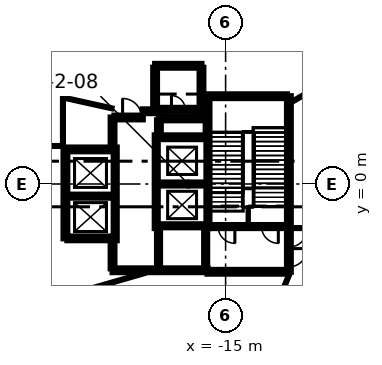
"""IFC4 building model, lengths in metres.
Left out: names, types, materials, properties, quantities, classifications, styles, units other than length and angle.
Written with IfcOpenShell. Run it as: python <this file> out.ifc"""

import sys

from ifc_helpers import new_model, si_unit, direction, frame, frame_2d, origin, place, context, subcontext, project, spatial, rectangle, extrude, element, fill, save


model = new_model("IFC4")
c1 = context("Model", 3, precision=1e-05, world=origin(), true_north=direction((0.0, 1.0)))
c2 = subcontext(c1, "Body", "Model", "MODEL_VIEW")
j1 = project(units=[si_unit("LENGTHUNIT", "METRE"), si_unit("PLANEANGLEUNIT", "RADIAN")], contexts=[c1])
p1 = place(None, origin())
s1 = spatial("IfcSite", under=j1, at=p1, CompositionType="ELEMENT")
p2 = place(p1, origin())
s2 = spatial("IfcBuilding", under=s1, at=p2, CompositionType="ELEMENT")
p3 = place(p2, origin())
s3 = spatial("IfcBuildingStorey", under=s2, at=p3, CompositionType="ELEMENT", Elevation=0.0)
p4 = place(p3, frame((-10.837, 5.775, 0.0), z_axis=(0.0, 0.0, 1.0), x_axis=(0.0, -1.0, 0.0)))
e1 = element("IfcWall", 1, at=p4, inside=s3, PredefinedType="SHEAR", context=c2, shape_type="SweptSolid", body=[
    extrude(rectangle(XDim=11.55, YDim=0.25, at=frame_2d((5.775, 0.0))), origin(), (0.0, 0.0, 1.0), 7.1),
])
p5 = place(p4, frame((10.025, 0.0, 0.0)))
e2 = element("IfcOpeningElement", 2, at=p5, cuts=e1, PredefinedType="OPENING", context=c2, shape_type="SweptSolid", body=[
    extrude(rectangle(XDim=1.2, YDim=2.1, at=frame_2d((0.6, 1.05))), frame((0.0, 0.135, 0.0), z_axis=(0.0, -1.0, 0.0), x_axis=(1.0, 0.0, 0.0)), (0.0, 0.0, 1.0), 0.27),
])
p6 = place(p4, frame((8.725, 0.0, 0.0)))
e3 = element("IfcOpeningElement", 3, at=p6, cuts=e1, PredefinedType="OPENING", context=c2, shape_type="SweptSolid", body=[
    extrude(rectangle(XDim=1.2, YDim=2.1, at=frame_2d((0.6, 1.05))), frame((0.0, 0.135, 0.0), z_axis=(0.0, -1.0, 0.0), x_axis=(1.0, 0.0, 0.0)), (0.0, 0.0, 1.0), 0.27),
])
p7 = place(p3, frame((-16.187, -5.675, 0.0), z_axis=(0.0, 0.0, 1.0), x_axis=(-1.0, 0.0, 0.0)))
e4 = element("IfcWall", 4, at=p7, inside=s3, PredefinedType="SHEAR", context=c2, shape_type="SweptSolid", body=[
    extrude(rectangle(XDim=6.25, YDim=0.25, at=frame_2d((3.125, 0.0))), origin(), (0.0, 0.0, 1.0), 7.1),
])
p8 = place(p3, frame((-25.537, -3.575, 0.0), z_axis=(0.0, 0.0, 1.0), x_axis=(0.0, 1.0, 0.0)))
e5 = element("IfcWall", 5, at=p8, inside=s3, PredefinedType="SHEAR", context=c2, shape_type="SweptSolid", body=[
    extrude(rectangle(XDim=5.85, YDim=0.25, at=frame_2d((2.925, 0.0))), origin(), (0.0, 0.0, 1.0), 7.1),
])
p9 = place(p3, frame((-10.963, -5.775, 0.0), z_axis=(0.0, 0.0, 1.0), x_axis=(-1.0, 0.0, 0.0)))
e6 = element("IfcWall", 6, at=p9, inside=s3, PredefinedType="SHEAR", context=c2, shape_type="SweptSolid", body=[
    extrude(rectangle(XDim=5.225, YDim=0.25, at=frame_2d((2.612, 0.0))), origin(), (0.0, 0.0, 1.0), 7.1),
])
p10 = place(p3, frame((-16.472, 5.775, 0.0), z_axis=(0.0, 0.0, 1.0), x_axis=(1.0, 0.0, 0.0)))
e7 = element("IfcWall", 7, at=p10, inside=s3, PredefinedType="SHEAR", context=c2, shape_type="SweptSolid", body=[
    extrude(rectangle(XDim=5.51, YDim=0.25, at=frame_2d((2.755, 0.0))), origin(), (0.0, 0.0, 1.0), 7.1),
])
p11 = place(p3, frame((-19.387, 3.075, 0.0), z_axis=(0.0, 0.0, 1.0), x_axis=(1.0, 0.0, 0.0)))
e8 = element("IfcWall", 8, at=p11, inside=s3, PredefinedType="SHEAR", context=c2, shape_type="SweptSolid", body=[
    extrude(rectangle(XDim=3.2, YDim=0.25, at=frame_2d((1.6, 0.0))), origin(), (0.0, 0.0, 1.0), 7.1),
])
for number, where, z_axis, x_axis in (
    (9, (-22.437, -3.575, 0.0), (0.0, 0.0, 1.0), (-1.0, 0.0, 0.0)),
    (10, (-25.412, 2.275, 0.0), (0.0, 0.0, 1.0), (1.0, 0.0, 0.0)),
):
    element("IfcWall", number, at=place(p3, frame(where, z_axis=z_axis, x_axis=x_axis)), inside=s3, PredefinedType="SHEAR", context=c2, shape_type="SweptSolid", body=[
        extrude(rectangle(XDim=2.975, YDim=0.25, at=frame_2d((1.487, 0.0))), origin(), (0.0, 0.0, 1.0), 7.1),
    ])
p12 = place(p3, frame((-19.637, 7.775, 0.0), z_axis=(0.0, 0.0, 1.0), x_axis=(1.0, 0.0, 0.0)))
e11 = element("IfcWall", 11, at=p12, inside=s3, PredefinedType="SHEAR", context=c2, shape_type="SweptSolid", body=[
    extrude(rectangle(XDim=3.05, YDim=0.25, at=frame_2d((1.525, 0.0))), origin(), (0.0, 0.0, 1.0), 7.1),
])
for number, where, z_axis, x_axis in (
    (12, (-16.587, 7.65, 0.0), (0.0, 0.0, 1.0), (0.0, -1.0, 0.0)),
    (13, (-19.637, 4.785, 0.0), (0.0, 0.0, 1.0), (0.0, 1.0, 0.0)),
):
    element("IfcWall", number, at=place(p3, frame(where, z_axis=z_axis, x_axis=x_axis)), inside=s3, PredefinedType="SHEAR", context=c2, shape_type="SweptSolid", body=[
        extrude(rectangle(XDim=2.865, YDim=0.25, at=frame_2d((1.432, 0.0))), origin(), (0.0, 0.0, 1.0), 7.1),
    ])
p13 = place(p3, frame((-16.302, 4.315, 0.0), z_axis=(0.0, 0.0, 1.0), x_axis=(-1.0, 0.0, 0.0)))
e14 = element("IfcWall", 14, at=p13, inside=s3, PredefinedType="SHEAR", context=c2, shape_type="SweptSolid", body=[
    extrude(rectangle(XDim=3.085, YDim=0.25, at=frame_2d((1.542, 0.0))), origin(), (0.0, 0.0, 1.0), 7.1),
])
p14 = place(p3, frame((-16.187, 3.2, 0.0), z_axis=(0.0, 0.0, 1.0), x_axis=(0.0, 1.0, 0.0)))
e15 = element("IfcWall", 15, at=p14, inside=s3, PredefinedType="SHEAR", context=c2, shape_type="SweptSolid", body=[
    extrude(rectangle(XDim=2.449, YDim=0.25, at=frame_2d((1.225, 0.0))), origin(), (0.0, 0.0, 1.0), 7.1),
])
p15 = place(p3, frame((-22.437, 2.4, 0.0), z_axis=(0.0, 0.0, 1.0), x_axis=(0.0, 1.0, 0.0)))
e16 = element("IfcWall", 16, at=p15, inside=s3, PredefinedType="SHEAR", context=c2, shape_type="SweptSolid", body=[
    extrude(rectangle(XDim=1.975, YDim=0.25, at=frame_2d((0.987, 0.0))), origin(), (0.0, 0.0, 1.0), 7.1),
])
p16 = place(p3, frame((-22.437, -5.55, 0.0), z_axis=(0.0, 0.0, 1.0), x_axis=(0.0, 1.0, 0.0)))
e17 = element("IfcWall", 17, at=p16, inside=s3, PredefinedType="SHEAR", context=c2, shape_type="SweptSolid", body=[
    extrude(rectangle(XDim=1.849, YDim=0.25, at=frame_2d((0.925, 0.0))), origin(), (0.0, 0.0, 1.0), 7.1),
])
p17 = place(p3, frame((-22.312, 4.375, 0.0), z_axis=(0.0, 0.0, 1.0), x_axis=(1.0, 0.0, 0.0)))
e18 = element("IfcWall", 18, at=p17, inside=s3, PredefinedType="SHEAR", context=c2, shape_type="SweptSolid", body=[
    extrude(rectangle(XDim=1.865, YDim=0.25, at=frame_2d((0.932, 0.0))), origin(), (0.0, 0.0, 1.0), 7.1),
])
p18 = place(p17, frame((0.535, 0.0, 0.0)))
e19 = element("IfcOpeningElement", 19, at=p18, cuts=e18, PredefinedType="OPENING", context=c2, shape_type="SweptSolid", body=[
    extrude(rectangle(XDim=1.25, YDim=2.1, at=frame_2d((0.625, 1.05))), frame((0.0, 0.135, 0.0), z_axis=(0.0, -1.0, 0.0), x_axis=(1.0, 0.0, 0.0)), (0.0, 0.0, 1.0), 0.27),
])
p19 = place(p3, frame((-19.387, 4.19, 0.0), z_axis=(0.0, 0.0, 1.0), x_axis=(0.0, -1.0, 0.0)))
e20 = element("IfcWall", 20, at=p19, inside=s3, PredefinedType="SHEAR", context=c2, shape_type="SweptSolid", body=[
    extrude(rectangle(XDim=0.989, YDim=0.25, at=frame_2d((0.495, 0.0))), origin(), (0.0, 0.0, 1.0), 7.1),
])
p20 = place(p3, frame((-20.447, 4.785, 0.0), z_axis=(0.0, 0.0, 1.0), x_axis=(1.0, 0.0, 0.0)))
e21 = element("IfcWall", 21, at=p20, inside=s3, PredefinedType="SHEAR", context=c2, shape_type="SweptSolid", body=[
    extrude(rectangle(XDim=0.685, YDim=0.25, at=frame_2d((0.342, 0.0))), origin(), (0.0, 0.0, 1.0), 7.1),
])
p21 = place(p3, frame((-16.577, 4.785, 0.0), z_axis=(0.0, 0.0, 1.0), x_axis=(0.0, -1.0, 0.0)))
e22 = element("IfcWall", 22, at=p21, inside=s3, PredefinedType="SHEAR", context=c2, shape_type="SweptSolid", body=[
    extrude(rectangle(XDim=0.344, YDim=0.25, at=frame_2d((0.172, 0.0))), origin(), (0.0, 0.0, 1.0), 7.1),
])
p22 = place(p3, frame((-16.162, 2.951, 0.0), z_axis=(0.0, 0.0, 1.0), x_axis=(0.0, -1.0, 0.0)))
e23 = element("IfcWall", 23, at=p22, inside=s3, PredefinedType="SHEAR", context=c2, shape_type="SweptSolid", body=[
    extrude(rectangle(XDim=5.851, YDim=0.2, at=frame_2d((2.925, 0.0))), origin(), (0.0, 0.0, 1.0), 7.1),
])
p23 = place(p3, frame((-19.562, -2.9, 0.0), z_axis=(0.0, 0.0, 1.0), x_axis=(0.0, 1.0, 0.0)))
e24 = element("IfcWall", 24, at=p23, inside=s3, PredefinedType="SHEAR", context=c2, shape_type="SweptSolid", body=[
    extrude(rectangle(XDim=6.1, YDim=0.2, at=frame_2d((3.05, 0.0))), origin(), (0.0, 0.0, 1.0), 7.1),
])
p24 = place(p23, frame((3.95, 0.0, 0.0)))
e25 = element("IfcOpeningElement", 25, at=p24, cuts=e24, PredefinedType="OPENING", context=c2, shape_type="SweptSolid", body=[
    extrude(rectangle(XDim=1.1, YDim=2.1, at=frame_2d((0.55, 1.05))), frame((0.0, 0.11, 0.0), z_axis=(0.0, -1.0, 0.0), x_axis=(1.0, 0.0, 0.0)), (0.0, 0.0, 1.0), 0.22),
])
p25 = place(p23, frame((0.968, 0.0, 0.0)))
e26 = element("IfcOpeningElement", 26, at=p25, cuts=e24, PredefinedType="OPENING", context=c2, shape_type="SweptSolid", body=[
    extrude(rectangle(XDim=1.1, YDim=2.1, at=frame_2d((0.55, 1.05))), frame((0.0, 0.11, 0.0), z_axis=(0.0, -1.0, 0.0), x_axis=(1.0, 0.0, 0.0)), (0.0, 0.0, 1.0), 0.22),
])
p26 = place(p3, frame((-22.262, 2.4, 0.0), z_axis=(0.0, 0.0, 1.0), x_axis=(0.0, -1.0, 0.0)))
e27 = element("IfcWall", 27, at=p26, inside=s3, PredefinedType="SHEAR", context=c2, shape_type="SweptSolid", body=[
    extrude(rectangle(XDim=6.1, YDim=0.2, at=frame_2d((3.05, 0.0))), origin(), (0.0, 0.0, 1.0), 7.1),
])
p27 = place(p26, frame((1.0, 0.0, 0.0)))
e28 = element("IfcOpeningElement", 28, at=p27, cuts=e27, PredefinedType="OPENING", context=c2, shape_type="SweptSolid", body=[
    extrude(rectangle(XDim=1.2, YDim=2.1, at=frame_2d((0.6, 1.05))), frame((0.0, 0.11, 0.0), z_axis=(0.0, -1.0, 0.0), x_axis=(1.0, 0.0, 0.0)), (0.0, 0.0, 1.0), 0.22),
])
p28 = place(p26, frame((4.05, 0.0, 0.0)))
e29 = element("IfcOpeningElement", 29, at=p28, cuts=e27, PredefinedType="OPENING", context=c2, shape_type="SweptSolid", body=[
    extrude(rectangle(XDim=1.2, YDim=2.1, at=frame_2d((0.6, 1.05))), frame((0.0, 0.11, 0.0), z_axis=(0.0, -1.0, 0.0), x_axis=(1.0, 0.0, 0.0)), (0.0, 0.0, 1.0), 0.22),
])
p29 = place(p3, frame((-10.963, -2.8, 0.0), z_axis=(0.0, 0.0, 1.0), x_axis=(-1.0, 0.0, 0.0)))
e30 = element("IfcWall", 30, at=p29, inside=s3, PredefinedType="SHEAR", context=c2, shape_type="SweptSolid", body=[
    extrude(rectangle(XDim=5.098, YDim=0.2, at=frame_2d((2.549, 0.0))), origin(), (0.0, 0.0, 1.0), 7.1),
])
p30 = place(p29, frame((0.569, 0.0, 0.0)))
e31 = element("IfcOpeningElement", 31, at=p30, cuts=e30, PredefinedType="OPENING", context=c2, shape_type="SweptSolid", body=[
    extrude(rectangle(XDim=1.1, YDim=2.1, at=frame_2d((0.55, 1.05))), frame((0.0, 0.11, 0.0), z_axis=(0.0, -1.0, 0.0), x_axis=(1.0, 0.0, 0.0)), (0.0, 0.0, 1.0), 0.22),
])
p31 = place(p29, frame((3.428, 0.0, 0.0)))
e32 = element("IfcOpeningElement", 32, at=p31, cuts=e30, PredefinedType="OPENING", context=c2, shape_type="SweptSolid", body=[
    extrude(rectangle(XDim=1.1, YDim=2.1, at=frame_2d((0.55, 1.05))), frame((0.0, 0.11, 0.0), z_axis=(0.0, -1.0, 0.0), x_axis=(1.0, 0.0, 0.0)), (0.0, 0.0, 1.0), 0.22),
])
p32 = place(p3, frame((-16.263, 0.0, 0.0), z_axis=(0.0, 0.0, 1.0), x_axis=(-1.0, 0.0, 0.0)))
e33 = element("IfcWall", 33, at=p32, inside=s3, PredefinedType="SHEAR", context=c2, shape_type="SweptSolid", body=[
    extrude(rectangle(XDim=3.198, YDim=0.2, at=frame_2d((1.599, 0.0))), origin(), (0.0, 0.0, 1.0), 7.1),
])
p33 = place(p3, frame((-22.363, -0.8, 0.0), z_axis=(0.0, 0.0, 1.0), x_axis=(-1.0, 0.0, 0.0)))
e34 = element("IfcWall", 34, at=p33, inside=s3, PredefinedType="SHEAR", context=c2, shape_type="SweptSolid", body=[
    extrude(rectangle(XDim=3.048, YDim=0.2, at=frame_2d((1.524, 0.0))), origin(), (0.0, 0.0, 1.0), 7.1),
])
p34 = place(p3, frame((-19.511, 4.91, 0.0), z_axis=(0.0, 0.0, 1.0), x_axis=(1.0, 0.0, 0.0)))
e35 = element("IfcWall", 35, at=p34, inside=s3, PredefinedType="SHEAR", context=c2, shape_type="SweptSolid", body=[
    extrude(rectangle(XDim=2.798, YDim=0.2, at=frame_2d((1.399, 0.0))), origin(), (0.0, 0.0, 1.0), 7.1),
])
p35 = place(p34, frame((0.949, 0.0, 0.0)))
e36 = element("IfcOpeningElement", 36, at=p35, cuts=e35, PredefinedType="OPENING", context=c2, shape_type="SweptSolid", body=[
    extrude(rectangle(XDim=0.9, YDim=2.1, at=frame_2d((0.45, 1.05))), frame((0.0, 0.11, 0.0), z_axis=(0.0, -1.0, 0.0), x_axis=(1.0, 0.0, 0.0)), (0.0, 0.0, 1.0), 0.22),
])
p36 = place(p3, frame((-19.412, -2.75, 0.0), z_axis=(0.0, 0.0, 1.0), x_axis=(1.0, 0.0, 0.0)))
e37 = element("IfcWall", 37, at=p36, inside=s3, PredefinedType="SHEAR", context=c2, shape_type="SweptSolid", body=[
    extrude(rectangle(XDim=3.1, YDim=0.2, at=frame_2d((1.55, 0.0))), origin(), (0.0, 0.0, 1.0), 7.1),
])
p37 = place(p3, frame((-16.312, -2.898, 0.0), z_axis=(0.0, 0.0, 1.0), x_axis=(0.0, -1.0, 0.0)))
e38 = element("IfcWall", 38, at=p37, inside=s3, PredefinedType="SHEAR", context=c2, shape_type="SweptSolid", body=[
    extrude(rectangle(XDim=2.651, YDim=0.2, at=frame_2d((1.325, 0.0))), origin(), (0.0, 0.0, 1.0), 7.1),
])
p38 = place(p37, frame((0.652, 0.0, 0.0)))
e39 = element("IfcOpeningElement", 39, at=p38, cuts=e38, PredefinedType="OPENING", context=c2, shape_type="SweptSolid", body=[
    extrude(rectangle(XDim=1.3, YDim=2.1, at=frame_2d((0.65, 1.05))), frame((0.0, 0.11, 0.0), z_axis=(0.0, -1.0, 0.0), x_axis=(1.0, 0.0, 0.0)), (0.0, 0.0, 1.0), 0.22),
])
p39 = place(p3, frame((-19.412, -5.549, 0.0), z_axis=(0.0, 0.0, 1.0), x_axis=(0.0, 1.0, 0.0)))
e40 = element("IfcWall", 40, at=p39, inside=s3, PredefinedType="SHEAR", context=c2, shape_type="SweptSolid", body=[
    extrude(rectangle(XDim=2.651, YDim=0.2, at=frame_2d((1.325, 0.0))), origin(), (0.0, 0.0, 1.0), 7.1),
])
p40 = place(p3, frame((-13.512, -2.695, 0.0), z_axis=(0.0, 0.0, 1.0), x_axis=(0.0, 1.0, 0.0)))
e41 = element("IfcWall", 41, at=p40, inside=s3, PredefinedType="PARTITIONING", context=c2, shape_type="SweptSolid", body=[
    extrude(rectangle(XDim=1.18, YDim=0.15, at=frame_2d((0.59, 0.0))), origin(), (0.0, 0.0, 1.0), 7.1),
])
p41 = place(p3, frame((-16.602, -20.015, 0.0), z_axis=(0.0, 0.0, 1.0), x_axis=(0.380627809016, 0.924728322808, 0.0)))
e42 = element("IfcWall", 42, at=p41, inside=s3, PredefinedType="PARTITIONING", context=c2, shape_type="SweptSolid", body=[
    extrude(rectangle(XDim=15.199, YDim=0.2, at=frame_2d((7.6, 0.0))), origin(), (0.0, 0.0, 1.0), 4.7),
])
p42 = place(p3, frame((-14.266, -21.167, 0.0), z_axis=(0.0, 0.0, 1.0), x_axis=(0.380713644122, 0.924692987526, 0.0)))
e43 = element("IfcWall", 43, at=p42, inside=s3, PredefinedType="PARTITIONING", context=c2, shape_type="SweptSolid", body=[
    extrude(rectangle(XDim=15.96, YDim=0.2, at=frame_2d((7.98, 0.0))), origin(), (0.0, 0.0, 1.0), 4.7),
])
p43 = place(p3, frame((-10.652, -2.9, 0.0), z_axis=(0.0, 0.0, 1.0), x_axis=(1.0, 0.0, 0.0)))
e44 = element("IfcWall", 44, at=p43, inside=s3, PredefinedType="PARTITIONING", context=c2, shape_type="SweptSolid", body=[
    extrude(rectangle(XDim=2.506, YDim=0.2, at=frame_2d((1.253, 0.0))), origin(), (0.0, 0.0, 1.0), 7.1),
])
p44 = place(p3, frame((-44.998, -12.972, 0.0), z_axis=(0.0, 0.0, 1.0), x_axis=(0.960873245647, 0.27698845788, 0.0)))
e45 = element("IfcWall", 45, at=p44, inside=s3, PredefinedType="PARTITIONING", context=c2, shape_type="SweptSolid", body=[
    extrude(rectangle(XDim=25.676, YDim=0.2, at=frame_2d((12.838, 0.0))), origin(), (0.0, 0.0, 1.0), 4.7),
])
p45 = place(p44, frame((11.946, 0.0, 0.0)))
e46 = element("IfcOpeningElement", 46, at=p45, cuts=e45, PredefinedType="OPENING", context=c2, shape_type="SweptSolid", body=[
    extrude(rectangle(XDim=2.0, YDim=2.1, at=frame_2d((1.0, 1.05))), frame((0.0, 0.11, 0.0), z_axis=(0.0, -1.0, 0.0), x_axis=(1.0, 0.0, 0.0)), (0.0, 0.0, 1.0), 0.22),
])
p46 = place(p3, frame((-38.998, 2.5, 0.0), z_axis=(0.0, 0.0, 1.0), x_axis=(1.0, 0.0, 0.0)))
e47 = element("IfcWall", 47, at=p46, inside=s3, PredefinedType="PARTITIONING", context=c2, shape_type="SweptSolid", body=[
    extrude(rectangle(XDim=13.298, YDim=0.2, at=frame_2d((6.649, 0.0))), origin(), (0.0, 0.0, 1.0), 7.1),
])
p47 = place(p46, frame((6.199, 0.0, 0.0)))
e48 = element("IfcOpeningElement", 48, at=p47, cuts=e47, PredefinedType="OPENING", context=c2, shape_type="SweptSolid", body=[
    extrude(rectangle(XDim=0.9, YDim=2.1, at=frame_2d((0.45, 1.05))), frame((0.0, 0.11, 0.0), z_axis=(0.0, -1.0, 0.0), x_axis=(1.0, 0.0, 0.0)), (0.0, 0.0, 1.0), 0.22),
])
p48 = place(p3, frame((-25.7, 2.5, 0.0), z_axis=(0.0, 0.0, 1.0), x_axis=(0.0, 1.0, 0.0)))
e49 = element("IfcWall", 49, at=p48, inside=s3, PredefinedType="PARTITIONING", context=c2, shape_type="SweptSolid", body=[
    extrude(rectangle(XDim=3.187, YDim=0.2, at=frame_2d((1.594, 0.0))), origin(), (0.0, 0.0, 1.0), 7.1),
])
p49 = place(p3, frame((-25.698, 5.689, 0.0), z_axis=(0.0, 0.0, 1.0), x_axis=(0.976357548796, -0.216161830371, 0.0)))
e50 = element("IfcWall", 50, at=p49, inside=s3, PredefinedType="PARTITIONING", context=c2, shape_type="SweptSolid", body=[
    extrude(rectangle(XDim=3.364, YDim=0.2, at=frame_2d((1.682, 0.0))), origin(), (0.0, 0.0, 1.0), 7.1),
])
p50 = place(p3, frame((-10.652, 5.399, 0.0), z_axis=(0.0, 0.0, 1.0), x_axis=(0.866043217385, 0.49996914467, 0.0)))
e51 = element("IfcWall", 51, at=p50, inside=s3, PredefinedType="PARTITIONING", context=c2, shape_type="SweptSolid", body=[
    extrude(rectangle(XDim=10.366, YDim=0.2, at=frame_2d((5.183, 0.0))), origin(), (0.0, 0.0, 1.0), 7.1),
])
p51 = place(p50, frame((3.948, 0.0, 0.0)))
e52 = element("IfcOpeningElement", 52, at=p51, cuts=e51, PredefinedType="OPENING", context=c2, shape_type="SweptSolid", body=[
    extrude(rectangle(XDim=2.4, YDim=2.1, at=frame_2d((1.2, 1.05))), frame((0.0, 0.11, 0.0), z_axis=(0.0, -1.0, 0.0), x_axis=(1.0, 0.0, 0.0)), (0.0, 0.0, 1.0), 0.22),
])
p52 = place(p38, origin())
e53 = element("IfcDoor", 53, at=p52, inside=s3, OperationType="SLIDING_TO_LEFT", PredefinedType="DOOR", context=c2, shape_type="SweptSolid", body=[
    extrude(rectangle(XDim=1.3, YDim=2.1, at=frame_2d((0.65, 1.05))), frame((0.0, 0.025, 0.0), z_axis=(0.0, -1.0, 0.0), x_axis=(1.0, 0.0, 0.0)), (0.0, 0.0, 1.0), 0.05),
])
fill(e39, e53)
p53 = place(p24, origin())
e54 = element("IfcDoor", 54, at=p53, inside=s3, OperationType="DOUBLE_DOOR_SLIDING", PredefinedType="DOOR", context=c2, shape_type="SweptSolid", body=[
    extrude(rectangle(XDim=1.1, YDim=2.1, at=frame_2d((0.55, 1.05))), frame((0.0, 0.025, 0.0), z_axis=(0.0, -1.0, 0.0), x_axis=(1.0, 0.0, 0.0)), (0.0, 0.0, 1.0), 0.05),
])
fill(e25, e54)
p54 = place(p25, origin())
e55 = element("IfcDoor", 55, at=p54, inside=s3, OperationType="DOUBLE_DOOR_SLIDING", PredefinedType="DOOR", context=c2, shape_type="SweptSolid", body=[
    extrude(rectangle(XDim=1.1, YDim=2.1, at=frame_2d((0.55, 1.05))), frame((0.0, 0.025, 0.0), z_axis=(0.0, -1.0, 0.0), x_axis=(1.0, 0.0, 0.0)), (0.0, 0.0, 1.0), 0.05),
])
fill(e26, e55)
p55 = place(p27, origin())
e56 = element("IfcDoor", 56, at=p55, inside=s3, OperationType="DOUBLE_DOOR_SLIDING", PredefinedType="DOOR", context=c2, shape_type="SweptSolid", body=[
    extrude(rectangle(XDim=1.2, YDim=2.1, at=frame_2d((0.6, 1.05))), frame((0.0, 0.025, 0.0), z_axis=(0.0, -1.0, 0.0), x_axis=(1.0, 0.0, 0.0)), (0.0, 0.0, 1.0), 0.05),
])
fill(e28, e56)
p56 = place(p28, origin())
e57 = element("IfcDoor", 57, at=p56, inside=s3, OperationType="DOUBLE_DOOR_SLIDING", PredefinedType="DOOR", context=c2, shape_type="SweptSolid", body=[
    extrude(rectangle(XDim=1.2, YDim=2.1, at=frame_2d((0.6, 1.05))), frame((0.0, 0.025, 0.0), z_axis=(0.0, -1.0, 0.0), x_axis=(1.0, 0.0, 0.0)), (0.0, 0.0, 1.0), 0.05),
])
fill(e29, e57)
p57 = place(p18, origin())
e58 = element("IfcDoor", 58, at=p57, inside=s3, OperationType="SINGLE_SWING_LEFT", PredefinedType="DOOR", context=c2, shape_type="SweptSolid", body=[
    extrude(rectangle(XDim=1.25, YDim=2.1, at=frame_2d((0.625, 1.05))), frame((0.0, 0.025, 0.0), z_axis=(0.0, -1.0, 0.0), x_axis=(1.0, 0.0, 0.0)), (0.0, 0.0, 1.0), 0.05),
])
fill(e19, e58)
p58 = place(p5, origin())
e59 = element("IfcDoor", 59, at=p58, inside=s3, OperationType="SINGLE_SWING_LEFT", PredefinedType="DOOR", context=c2, shape_type="SweptSolid", body=[
    extrude(rectangle(XDim=1.2, YDim=2.1, at=frame_2d((0.6, 1.05))), frame((0.0, 0.025, 0.0), z_axis=(0.0, -1.0, 0.0), x_axis=(1.0, 0.0, 0.0)), (0.0, 0.0, 1.0), 0.05),
])
fill(e2, e59)
p59 = place(p6, origin())
e60 = element("IfcDoor", 60, at=p59, inside=s3, OperationType="SINGLE_SWING_RIGHT", PredefinedType="DOOR", context=c2, shape_type="SweptSolid", body=[
    extrude(rectangle(XDim=1.2, YDim=2.1, at=frame_2d((0.6, 1.05))), frame((0.0, 0.025, 0.0), z_axis=(0.0, -1.0, 0.0), x_axis=(1.0, 0.0, 0.0)), (0.0, 0.0, 1.0), 0.05),
])
fill(e3, e60)
p60 = place(p35, origin())
e61 = element("IfcDoor", 61, at=p60, inside=s3, OperationType="SINGLE_SWING_RIGHT", PredefinedType="DOOR", context=c2, shape_type="SweptSolid", body=[
    extrude(rectangle(XDim=0.9, YDim=2.1, at=frame_2d((0.45, 1.05))), frame((0.0, 0.025, 0.0), z_axis=(0.0, -1.0, 0.0), x_axis=(1.0, 0.0, 0.0)), (0.0, 0.0, 1.0), 0.05),
])
fill(e36, e61)
p61 = place(p30, origin())
e62 = element("IfcDoor", 62, at=p61, inside=s3, OperationType="SINGLE_SWING_LEFT", PredefinedType="DOOR", context=c2, shape_type="SweptSolid", body=[
    extrude(rectangle(XDim=1.1, YDim=2.1, at=frame_2d((0.55, 1.05))), frame((0.0, 0.025, 0.0), z_axis=(0.0, -1.0, 0.0), x_axis=(1.0, 0.0, 0.0)), (0.0, 0.0, 1.0), 0.05),
])
fill(e31, e62)
p62 = place(p31, origin())
e63 = element("IfcDoor", 63, at=p62, inside=s3, OperationType="SINGLE_SWING_RIGHT", PredefinedType="DOOR", context=c2, shape_type="SweptSolid", body=[
    extrude(rectangle(XDim=1.1, YDim=2.1, at=frame_2d((0.55, 1.05))), frame((0.0, 0.025, 0.0), z_axis=(0.0, -1.0, 0.0), x_axis=(1.0, 0.0, 0.0)), (0.0, 0.0, 1.0), 0.05),
])
fill(e32, e63)
save(model, sys.argv[1])
